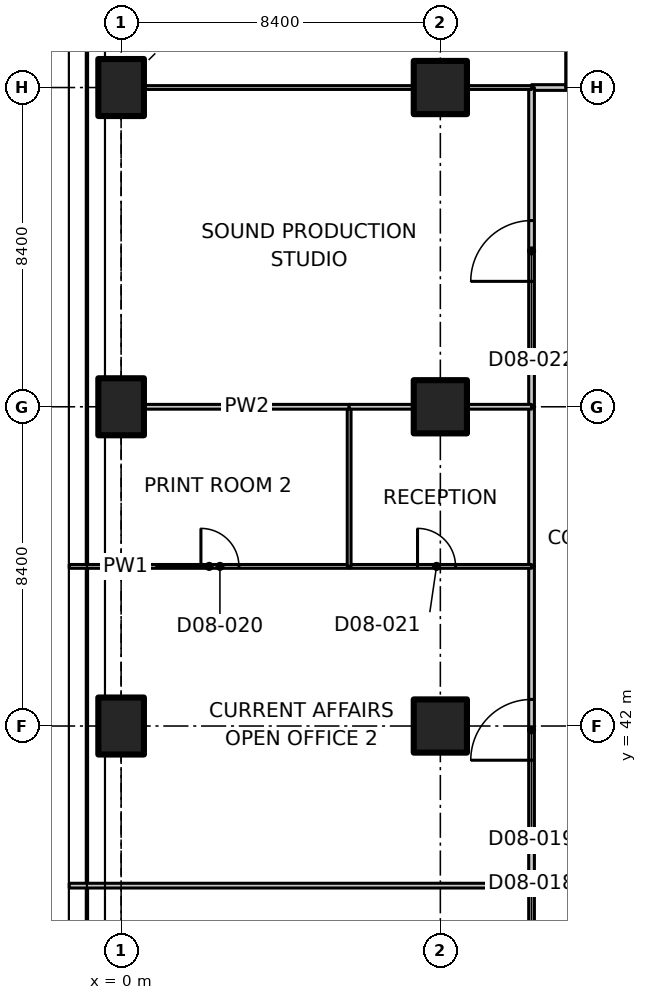
"""IFC4 building model, lengths in metres.
Left out: names, types, materials, properties, quantities, classifications, styles, units other than length and angle.
Written with IfcOpenShell. Run it as: python <this file> out.ifc"""

import sys

from ifc_helpers import new_model, si_unit, direction, frame, frame_2d, origin, origin_2d, place, context, subcontext, project, spatial, polyline, rectangle, outline, extrude, element, fill, save


model = new_model("IFC4")
c1 = context("Model", 3, precision=1e-05, world=origin(), true_north=direction((0.0, 1.0)))
c2 = subcontext(c1, "Body", "Model", "MODEL_VIEW")
j1 = project(units=[si_unit("LENGTHUNIT", "METRE"), si_unit("PLANEANGLEUNIT", "RADIAN")], contexts=[c1])
p1 = place(None, origin())
s1 = spatial("IfcSite", under=j1, at=p1, CompositionType="ELEMENT")
p2 = place(p1, origin())
s2 = spatial("IfcBuilding", under=s1, at=p2, CompositionType="ELEMENT")
p3 = place(p2, frame((0.0, 0.0, 47.3)))
s3 = spatial("IfcBuildingStorey", under=s2, at=p3, CompositionType="ELEMENT", Elevation=47.3)
for number, where, z_axis, x_axis in (
    (1, (0.0, 42.0, 0.0), (0.0, 0.0, 1.0), (1.0, 0.0, 0.0)),
    (2, (0.0, 50.4, 0.0), (0.0, 0.0, 1.0), (1.0, 0.0, 0.0)),
    (3, (0.0, 58.8, 0.0), (0.0, 0.0, 1.0), (1.0, 0.0, 0.0)),
):
    element("IfcColumn", number, at=place(p3, frame(where, z_axis=z_axis, x_axis=x_axis)), inside=s3, PredefinedType="COLUMN", context=c2, shape_type="SweptSolid", body=[
        extrude(rectangle(XDim=1.2, YDim=1.5, at=origin_2d()), origin(), (0.0, 0.0, 1.0), 3.35),
    ])
for number, where, z_axis, x_axis in (
    (4, (8.4, 42.0, 0.0), (0.0, 0.0, 1.0), (1.0, 0.0, 0.0)),
    (5, (8.4, 50.4, 0.0), (0.0, 0.0, 1.0), (1.0, 0.0, 0.0)),
    (6, (8.4, 58.8, 0.0), (0.0, 0.0, 1.0), (1.0, 0.0, 0.0)),
):
    element("IfcColumn", number, at=place(p3, frame(where, z_axis=z_axis, x_axis=x_axis)), inside=s3, PredefinedType="COLUMN", context=c2, shape_type="SweptSolid", body=[
        extrude(rectangle(XDim=1.4, YDim=1.4, at=origin_2d()), origin(), (0.0, 0.0, 1.0), 3.35),
    ])
p4 = place(p3, frame((10.8, 58.8, 0.0), z_axis=(0.0, 0.0, 1.0), x_axis=(1.0, 0.0, 0.0)))
e7 = element("IfcWall", 7, at=p4, inside=s3, PredefinedType="PARTITIONING", context=c2, shape_type="SweptSolid", body=[
    extrude(rectangle(XDim=3.6, YDim=0.15, at=frame_2d((1.8, 0.0))), origin(), (0.0, 0.0, 1.0), 3.33),
])
p5 = place(p4, frame((0.9, 0.0, 0.0)))
e8 = element("IfcOpeningElement", 8, at=p5, cuts=e7, PredefinedType="OPENING", context=c2, shape_type="SweptSolid", body=[
    extrude(rectangle(XDim=2.0, YDim=2.4, at=frame_2d((1.0, 1.2))), frame((0.0, 0.085, 0.0), z_axis=(0.0, -1.0, 0.0), x_axis=(1.0, 0.0, 0.0)), (0.0, 0.0, 1.0), 0.17),
])
p6 = place(p3, frame((10.8, 33.6, 0.0), z_axis=(0.0, 0.0, 1.0), x_axis=(0.0, 1.0, 0.0)))
e9 = element("IfcWall", 9, at=p6, inside=s3, PredefinedType="PARTITIONING", context=c2, shape_type="SweptSolid", body=[
    extrude(rectangle(XDim=4.2, YDim=0.15, at=frame_2d((2.1, 0.0))), origin(), (0.0, 0.0, 1.0), 3.33),
])
p7 = place(p6, frame((1.5, 0.0, 0.0)))
e10 = element("IfcOpeningElement", 10, at=p7, cuts=e9, PredefinedType="OPENING", context=c2, shape_type="SweptSolid", body=[
    extrude(rectangle(XDim=1.1, YDim=2.1, at=frame_2d((0.55, 1.05))), frame((0.0, 0.085, 0.0), z_axis=(0.0, -1.0, 0.0), x_axis=(1.0, 0.0, 0.0)), (0.0, 0.0, 1.0), 0.17),
])
p8 = place(p3, frame((10.8, 37.8, 0.0), z_axis=(0.0, 0.0, 1.0), x_axis=(0.0, 1.0, 0.0)))
e11 = element("IfcWall", 11, at=p8, inside=s3, PredefinedType="PARTITIONING", context=c2, shape_type="SweptSolid", body=[
    extrude(rectangle(XDim=8.4, YDim=0.15, at=frame_2d((4.2, 0.0))), origin(), (0.0, 0.0, 1.0), 3.33),
])
p9 = place(p8, frame((3.3, 0.0, 0.0)))
e12 = element("IfcOpeningElement", 12, at=p9, cuts=e11, PredefinedType="OPENING", context=c2, shape_type="SweptSolid", body=[
    extrude(rectangle(XDim=1.6, YDim=2.1, at=frame_2d((0.8, 1.05))), frame((0.0, 0.085, 0.0), z_axis=(0.0, -1.0, 0.0), x_axis=(1.0, 0.0, 0.0)), (0.0, 0.0, 1.0), 0.17),
])
p10 = place(p3, frame((10.8, 46.2, 0.0), z_axis=(0.0, 0.0, 1.0), x_axis=(0.0, 1.0, 0.0)))
e13 = element("IfcWall", 13, at=p10, inside=s3, PredefinedType="PARTITIONING", context=c2, shape_type="SweptSolid", body=[
    extrude(rectangle(XDim=4.2, YDim=0.15, at=frame_2d((2.1, 0.0))), origin(), (0.0, 0.0, 1.0), 3.33),
])
p11 = place(p3, frame((10.8, 50.4, 0.0), z_axis=(0.0, 0.0, 1.0), x_axis=(0.0, 1.0, 0.0)))
e14 = element("IfcWall", 14, at=p11, inside=s3, PredefinedType="PARTITIONING", context=c2, shape_type="SweptSolid", body=[
    extrude(rectangle(XDim=8.4, YDim=0.15, at=frame_2d((4.2, 0.0))), origin(), (0.0, 0.0, 1.0), 3.33),
])
p12 = place(p11, frame((3.3, 0.0, 0.0)))
e15 = element("IfcOpeningElement", 15, at=p12, cuts=e14, PredefinedType="OPENING", context=c2, shape_type="SweptSolid", body=[
    extrude(rectangle(XDim=1.6, YDim=2.1, at=frame_2d((0.8, 1.05))), frame((0.0, 0.085, 0.0), z_axis=(0.0, -1.0, 0.0), x_axis=(1.0, 0.0, 0.0)), (0.0, 0.0, 1.0), 0.17),
])
p13 = place(p3, frame((10.8, 58.8, 0.0), z_axis=(0.0, 0.0, 1.0), x_axis=(-1.0, 0.0, 0.0)))
e16 = element("IfcWall", 16, at=p13, inside=s3, PredefinedType="PARTITIONING", context=c2, shape_type="SweptSolid", body=[
    extrude(rectangle(XDim=1.68, YDim=0.1, at=frame_2d((0.84, 0.0))), origin(), (0.0, 0.0, 1.0), 3.33),
])
p14 = place(p3, frame((7.68, 58.8, 0.0), z_axis=(0.0, 0.0, 1.0), x_axis=(-1.0, 0.0, 0.0)))
e17 = element("IfcWall", 17, at=p14, inside=s3, PredefinedType="PARTITIONING", context=c2, shape_type="SweptSolid", body=[
    extrude(rectangle(XDim=7.06, YDim=0.1, at=frame_2d((3.53, 0.0))), origin(), (0.0, 0.0, 1.0), 3.33),
])
p15 = place(p3, frame((-1.365, 37.8, 0.0), z_axis=(0.0, 0.0, 1.0), x_axis=(1.0, 0.0, 0.0)))
e18 = element("IfcWall", 18, at=p15, inside=s3, PredefinedType="PARTITIONING", context=c2, shape_type="SweptSolid", body=[
    extrude(outline(polyline([(0.0, 0.0), (12.165, 0.0), (12.165, 3.33), (1.815, 3.33), (1.813, 2.98), (0.917, 2.98), (0.915, 3.33), (0.265, 3.33), (0.0, 3.33), (0.0, 0.0)])), frame((0.0, 0.062, 0.0), z_axis=(0.0, -1.0, 0.0), x_axis=(1.0, 0.0, 0.0)), (0.0, 0.0, 1.0), 0.125),
])
p16 = place(p3, frame((-1.365, 46.2, 0.0), z_axis=(0.0, 0.0, 1.0), x_axis=(1.0, 0.0, 0.0)))
e19 = element("IfcWall", 19, at=p16, inside=s3, PredefinedType="PARTITIONING", context=c2, shape_type="SweptSolid", body=[
    extrude(outline(polyline([(0.0, 0.0), (7.365, 0.0), (7.365, 3.33), (1.815, 3.33), (1.813, 2.98), (0.917, 2.98), (0.915, 3.33), (0.265, 3.33), (0.0, 3.33), (0.0, 0.0)])), frame((0.0, 0.05, 0.0), z_axis=(0.0, -1.0, 0.0), x_axis=(1.0, 0.0, 0.0)), (0.0, 0.0, 1.0), 0.1),
])
p17 = place(p16, frame((3.465, 0.0, 0.0)))
e20 = element("IfcOpeningElement", 20, at=p17, cuts=e19, PredefinedType="OPENING", context=c2, shape_type="SweptSolid", body=[
    extrude(rectangle(XDim=1.0, YDim=2.1, at=frame_2d((0.5, 1.05))), frame((0.0, 0.06, 0.0), z_axis=(0.0, -1.0, 0.0), x_axis=(1.0, 0.0, 0.0)), (0.0, 0.0, 1.0), 0.12),
])
p18 = place(p3, frame((6.0, 46.2, 0.0), z_axis=(0.0, 0.0, 1.0), x_axis=(1.0, 0.0, 0.0)))
e21 = element("IfcWall", 21, at=p18, inside=s3, PredefinedType="PARTITIONING", context=c2, shape_type="SweptSolid", body=[
    extrude(rectangle(XDim=4.8, YDim=0.1, at=frame_2d((2.4, 0.0))), origin(), (0.0, 0.0, 1.0), 3.33),
])
p19 = place(p18, frame((1.8, 0.0, 0.0)))
e22 = element("IfcOpeningElement", 22, at=p19, cuts=e21, PredefinedType="OPENING", context=c2, shape_type="SweptSolid", body=[
    extrude(rectangle(XDim=1.0, YDim=2.1, at=frame_2d((0.5, 1.05))), frame((0.0, 0.06, 0.0), z_axis=(0.0, -1.0, 0.0), x_axis=(1.0, 0.0, 0.0)), (0.0, 0.0, 1.0), 0.12),
])
p20 = place(p3, frame((6.0, 50.4, 0.0), z_axis=(0.0, 0.0, 1.0), x_axis=(0.0, -1.0, 0.0)))
e23 = element("IfcWall", 23, at=p20, inside=s3, PredefinedType="PARTITIONING", context=c2, shape_type="SweptSolid", body=[
    extrude(rectangle(XDim=4.2, YDim=0.1, at=frame_2d((2.1, 0.0))), origin(), (0.0, 0.0, 1.0), 3.33),
])
p21 = place(p3, frame((0.62, 50.4, 0.0), z_axis=(0.0, 0.0, 1.0), x_axis=(1.0, 0.0, 0.0)))
e24 = element("IfcWall", 24, at=p21, inside=s3, PredefinedType="PARTITIONING", context=c2, shape_type="SweptSolid", body=[
    extrude(rectangle(XDim=5.38, YDim=0.125, at=frame_2d((2.69, 0.0))), origin(), (0.0, 0.0, 1.0), 3.33),
])
for number, where, z_axis, x_axis in (
    (25, (6.0, 50.4, 0.0), (0.0, 0.0, 1.0), (1.0, 0.0, 0.0)),
    (26, (9.12, 50.4, 0.0), (0.0, 0.0, 1.0), (1.0, 0.0, 0.0)),
):
    element("IfcWall", number, at=place(p3, frame(where, z_axis=z_axis, x_axis=x_axis)), inside=s3, PredefinedType="PARTITIONING", context=c2, shape_type="SweptSolid", body=[
        extrude(rectangle(XDim=1.68, YDim=0.125, at=frame_2d((0.84, 0.0))), origin(), (0.0, 0.0, 1.0), 3.33),
    ])
p22 = place(p5, origin())
e27 = element("IfcDoor", 27, at=p22, inside=s3, OperationType="DOUBLE_DOOR_SINGLE_SWING", PredefinedType="DOOR", context=c2, shape_type="SweptSolid", body=[
    extrude(rectangle(XDim=2.0, YDim=2.4, at=frame_2d((1.0, 1.2))), frame((0.0, 0.025, 0.0), z_axis=(0.0, -1.0, 0.0), x_axis=(1.0, 0.0, 0.0)), (0.0, 0.0, 1.0), 0.05),
])
fill(e8, e27)
p23 = place(p9, origin())
e28 = element("IfcDoor", 28, at=p23, inside=s3, OperationType="DOUBLE_DOOR_SINGLE_SWING", PredefinedType="DOOR", context=c2, shape_type="SweptSolid", body=[
    extrude(rectangle(XDim=1.6, YDim=2.1, at=frame_2d((0.8, 1.05))), frame((0.0, 0.025, 0.0), z_axis=(0.0, -1.0, 0.0), x_axis=(1.0, 0.0, 0.0)), (0.0, 0.0, 1.0), 0.05),
])
fill(e12, e28)
p24 = place(p17, origin())
e29 = element("IfcDoor", 29, at=p24, inside=s3, OperationType="SINGLE_SWING_LEFT", PredefinedType="DOOR", context=c2, shape_type="SweptSolid", body=[
    extrude(rectangle(XDim=1.0, YDim=2.1, at=frame_2d((0.5, 1.05))), frame((0.0, 0.025, 0.0), z_axis=(0.0, -1.0, 0.0), x_axis=(1.0, 0.0, 0.0)), (0.0, 0.0, 1.0), 0.05),
])
fill(e20, e29)
p25 = place(p19, origin())
e30 = element("IfcDoor", 30, at=p25, inside=s3, OperationType="SINGLE_SWING_LEFT", PredefinedType="DOOR", context=c2, shape_type="SweptSolid", body=[
    extrude(rectangle(XDim=1.0, YDim=2.1, at=frame_2d((0.5, 1.05))), frame((0.0, 0.025, 0.0), z_axis=(0.0, -1.0, 0.0), x_axis=(1.0, 0.0, 0.0)), (0.0, 0.0, 1.0), 0.05),
])
fill(e22, e30)
p26 = place(p12, origin())
e31 = element("IfcDoor", 31, at=p26, inside=s3, OperationType="DOUBLE_DOOR_SINGLE_SWING", PredefinedType="DOOR", context=c2, shape_type="SweptSolid", body=[
    extrude(rectangle(XDim=1.6, YDim=2.1, at=frame_2d((0.8, 1.05))), frame((0.0, 0.025, 0.0), z_axis=(0.0, -1.0, 0.0), x_axis=(1.0, 0.0, 0.0)), (0.0, 0.0, 1.0), 0.05),
])
fill(e15, e31)
save(model, sys.argv[1])
